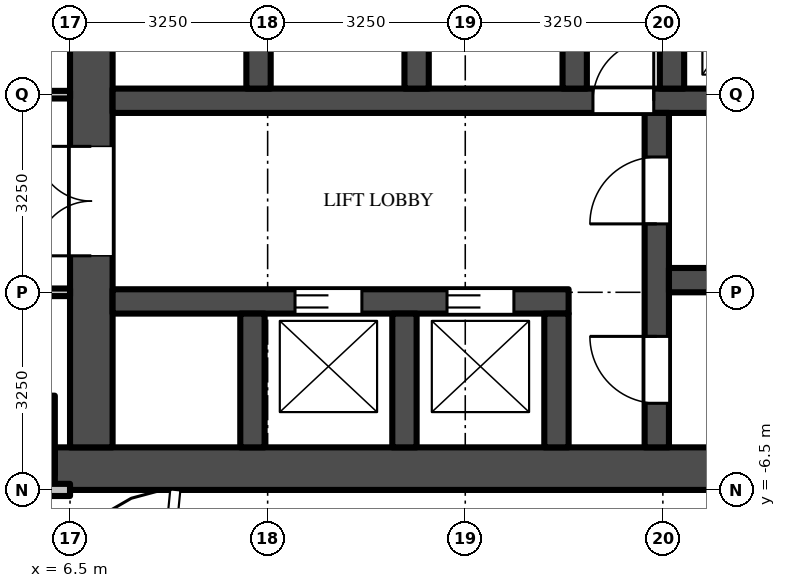
"""IFC4 building model, lengths in metres.
Left out: names, types, materials, properties, quantities, classifications, styles, units other than length and angle.
Written with IfcOpenShell. Run it as: python <this file> out.ifc"""

import sys

from ifc_helpers import new_model, si_unit, direction, frame, frame_2d, origin, origin_2d, place, context, subcontext, project, spatial, rectangle, extrude, source, transform, mapped, element, fill, save


model = new_model("IFC4")
c1 = context("Model", 3, precision=1e-05, world=origin(), true_north=direction((0.0, 1.0)))
c2 = subcontext(c1, "Body", "Model", "MODEL_VIEW")
j1 = project(units=[si_unit("LENGTHUNIT", "METRE"), si_unit("PLANEANGLEUNIT", "RADIAN")], contexts=[c1])
p1 = place(None, origin())
s1 = spatial("IfcSite", under=j1, at=p1, CompositionType="ELEMENT")
p2 = place(p1, origin())
s2 = spatial("IfcBuilding", under=s1, at=p2, CompositionType="ELEMENT")
p3 = place(p2, frame((0.0, 0.0, 129.0)))
s3 = spatial("IfcBuildingStorey", under=s2, at=p3, CompositionType="ELEMENT", Elevation=129.0)
m1 = source(origin(), c2, "Body", "SweptSolid", [
    extrude(rectangle(XDim=1.3, YDim=1.3, at=origin_2d()), origin(), (0.0, 0.0, 1.0), 4.5),
])
p4 = place(p3, frame((5.6, -5.6, 0.0), z_axis=(0.0, 0.0, 1.0), x_axis=(1.0, 0.0, 0.0)))
e1 = element("IfcColumn", 1, at=p4, inside=s3, PredefinedType="COLUMN", context=c2, shape_type="MappedRepresentation", body=[
    mapped(m1, transform((0.0, 0.0, 0.0))),
])
m2 = source(origin(), c2, "Body", "SweptSolid", [
    extrude(rectangle(XDim=16.5, YDim=0.7, at=frame_2d((8.25, 0.0))), origin(), (0.0, 0.0, 1.0), 4.25),
])
p5 = place(p3, frame((6.25, -6.15, 0.0), z_axis=(0.0, 0.0, 1.0), x_axis=(1.0, 0.0, 0.0)))
e2 = element("IfcWall", 2, at=p5, inside=s3, PredefinedType="SHEAR", context=c2, shape_type="MappedRepresentation", body=[
    mapped(m2, transform((0.0, 0.0, 0.0))),
])
m3 = source(origin(), c2, "Body", "SweptSolid", [
    extrude(rectangle(XDim=9.05, YDim=0.7, at=frame_2d((4.525, 0.0))), origin(), (0.0, 0.0, 1.0), 4.25),
])
p6 = place(p3, frame((6.85, -5.8, 0.0), z_axis=(0.0, 0.0, 1.0), x_axis=(0.0, 1.0, 0.0)))
e3 = element("IfcWall", 3, at=p6, inside=s3, PredefinedType="SHEAR", context=c2, shape_type="MappedRepresentation", body=[
    mapped(m3, transform((0.0, 0.0, 0.0))),
])
m4 = source(origin(), c2, "Body", "SweptSolid", [
    extrude(rectangle(XDim=1.8, YDim=2.1, at=frame_2d((0.9, 1.05))), frame((0.0, 0.36, 0.0), z_axis=(0.0, -1.0, 0.0), x_axis=(1.0, 0.0, 0.0)), (0.0, 0.0, 1.0), 0.72),
])
p7 = place(p6, frame((3.15, 0.0, 0.0)))
e4 = element("IfcOpeningElement", 4, at=p7, cuts=e3, PredefinedType="OPENING", context=c2, shape_type="MappedRepresentation", body=[
    mapped(m4, transform((0.0, 0.0, 0.0))),
])
m5 = source(origin(), c2, "Body", "SweptSolid", [
    extrude(rectangle(XDim=7.5, YDim=0.4, at=frame_2d((3.75, 0.0))), origin(), (0.0, 0.0, 1.0), 4.25),
])
p8 = place(p3, frame((7.2, -3.4, 0.0), z_axis=(0.0, 0.0, 1.0), x_axis=(1.0, 0.0, 0.0)))
e5 = element("IfcWall", 5, at=p8, inside=s3, PredefinedType="SHEAR", context=c2, shape_type="MappedRepresentation", body=[
    mapped(m5, transform((0.0, 0.0, 0.0))),
])
m6 = source(origin(), c2, "Body", "SweptSolid", [
    extrude(rectangle(XDim=1.1, YDim=2.1, at=frame_2d((0.55, 1.05))), frame((0.0, 0.21, 0.0), z_axis=(0.0, -1.0, 0.0), x_axis=(1.0, 0.0, 0.0)), (0.0, 0.0, 1.0), 0.42),
])
p9 = place(p8, frame((3.0, 0.0, 0.0)))
e6 = element("IfcOpeningElement", 6, at=p9, cuts=e5, PredefinedType="OPENING", context=c2, shape_type="MappedRepresentation", body=[
    mapped(m6, transform((0.0, 0.0, 0.0))),
])
p10 = place(p8, frame((5.5, 0.0, 0.0)))
e7 = element("IfcOpeningElement", 7, at=p10, cuts=e5, PredefinedType="OPENING", context=c2, shape_type="MappedRepresentation", body=[
    mapped(m6, transform((0.0, 0.0, 0.0))),
])
m7 = source(origin(), c2, "Body", "SweptSolid", [
    extrude(rectangle(XDim=14.85, YDim=0.4, at=frame_2d((7.425, 0.0))), origin(), (0.0, 0.0, 1.0), 4.25),
])
p11 = place(p3, frame((7.2, -0.1, 0.0), z_axis=(0.0, 0.0, 1.0), x_axis=(1.0, 0.0, 0.0)))
e8 = element("IfcWall", 8, at=p11, inside=s3, PredefinedType="SHEAR", context=c2, shape_type="MappedRepresentation", body=[
    mapped(m7, transform((0.0, 0.0, 0.0))),
])
m8 = source(origin(), c2, "Body", "SweptSolid", [
    extrude(rectangle(XDim=1.0, YDim=2.1, at=frame_2d((0.5, 1.05))), frame((0.0, 0.21, 0.0), z_axis=(0.0, -1.0, 0.0), x_axis=(1.0, 0.0, 0.0)), (0.0, 0.0, 1.0), 0.42),
])
p12 = place(p11, frame((7.9, 0.0, 0.0)))
e9 = element("IfcOpeningElement", 9, at=p12, cuts=e8, PredefinedType="OPENING", context=c2, shape_type="MappedRepresentation", body=[
    mapped(m8, transform((0.0, 0.0, 0.0))),
])
m9 = source(origin(), c2, "Body", "SweptSolid", [
    extrude(rectangle(XDim=5.5, YDim=0.4, at=frame_2d((2.75, 0.0))), origin(), (0.0, 0.0, 1.0), 4.25),
])
p13 = place(p3, frame((16.15, -5.8, 0.0), z_axis=(0.0, 0.0, 1.0), x_axis=(0.0, 1.0, 0.0)))
e10 = element("IfcWall", 10, at=p13, inside=s3, PredefinedType="SHEAR", context=c2, shape_type="MappedRepresentation", body=[
    mapped(m9, transform((0.0, 0.0, 0.0))),
])
p14 = place(p13, frame((0.725, 0.0, 0.0)))
e11 = element("IfcOpeningElement", 11, at=p14, cuts=e10, PredefinedType="OPENING", context=c2, shape_type="MappedRepresentation", body=[
    mapped(m6, transform((0.0, 0.0, 0.0))),
])
p15 = place(p13, frame((3.675, 0.0, 0.0)))
e12 = element("IfcOpeningElement", 12, at=p15, cuts=e10, PredefinedType="OPENING", context=c2, shape_type="MappedRepresentation", body=[
    mapped(m6, transform((0.0, 0.0, 0.0))),
])
m10 = source(origin(), c2, "Body", "SweptSolid", [
    extrude(rectangle(XDim=5.7, YDim=0.4, at=frame_2d((2.85, 0.0))), origin(), (0.0, 0.0, 1.0), 4.25),
])
p16 = place(p3, frame((16.35, -3.05, 0.0), z_axis=(0.0, 0.0, 1.0), x_axis=(1.0, 0.0, 0.0)))
e13 = element("IfcWall", 13, at=p16, inside=s3, PredefinedType="SHEAR", context=c2, shape_type="MappedRepresentation", body=[
    mapped(m10, transform((0.0, 0.0, 0.0))),
])
m11 = source(origin(), c2, "Body", "SweptSolid", [
    extrude(rectangle(XDim=2.2, YDim=0.4, at=frame_2d((1.1, 0.0))), origin(), (0.0, 0.0, 1.0), 4.25),
])
for number, where, z_axis, x_axis in (
    (14, (9.5, -5.8, 0.0), (0.0, 0.0, 1.0), (0.0, 1.0, 0.0)),
    (15, (12.0, -5.8, 0.0), (0.0, 0.0, 1.0), (0.0, 1.0, 0.0)),
    (16, (14.5, -5.8, 0.0), (0.0, 0.0, 1.0), (0.0, 1.0, 0.0)),
):
    element("IfcWall", number, at=place(p3, frame(where, z_axis=z_axis, x_axis=x_axis)), inside=s3, PredefinedType="SHEAR", context=c2, shape_type="MappedRepresentation", body=[
        mapped(m11, transform((0.0, 0.0, 0.0))),
    ])
m12 = source(origin(), c2, "Body", "SweptSolid", [
    extrude(rectangle(XDim=2.45, YDim=0.4, at=frame_2d((1.225, 0.0))), origin(), (0.0, 0.0, 1.0), 4.25),
])
for number, where, z_axis, x_axis in (
    (17, (9.6, 0.1, 0.0), (0.0, 0.0, 1.0), (0.0, 1.0, 0.0)),
    (18, (12.2, 0.1, 0.0), (0.0, 0.0, 1.0), (0.0, 1.0, 0.0)),
    (19, (14.8, 0.1, 0.0), (0.0, 0.0, 1.0), (0.0, 1.0, 0.0)),
    (20, (16.4, 0.1, 0.0), (0.0, 0.0, 1.0), (0.0, 1.0, 0.0)),
):
    element("IfcWall", number, at=place(p3, frame(where, z_axis=z_axis, x_axis=x_axis)), inside=s3, PredefinedType="SHEAR", context=c2, shape_type="MappedRepresentation", body=[
        mapped(m12, transform((0.0, 0.0, 0.0))),
    ])
m13 = source(origin(), c2, "Body", "SweptSolid", [
    extrude(rectangle(XDim=2.75, YDim=0.2, at=frame_2d((1.375, 0.0))), origin(), (0.0, 0.0, 1.0), 3.33),
])
p17 = place(p3, frame((3.75, -6.5, 0.0), z_axis=(0.0, 0.0, 1.0), x_axis=(1.0, 0.0, 0.0)))
e21 = element("IfcWall", 21, at=p17, inside=s3, PredefinedType="PARTITIONING", context=c2, shape_type="MappedRepresentation", body=[
    mapped(m13, transform((0.0, 0.0, 0.0))),
])
m14 = source(origin(), c2, "Body", "SweptSolid", [
    extrude(rectangle(XDim=5.363, YDim=0.125, at=frame_2d((2.681, 0.0))), origin(), (0.0, 0.0, 1.0), 3.468),
])
p18 = place(p3, frame((6.5, -3.25, 0.0), z_axis=(0.0, 0.0, 1.0), x_axis=(-1.0, 0.0, 0.0)))
e22 = element("IfcWall", 22, at=p18, inside=s3, PredefinedType="PARTITIONING", context=c2, shape_type="MappedRepresentation", body=[
    mapped(m14, transform((0.0, 0.0, 0.0))),
])
m15 = source(origin(), c2, "Body", "SweptSolid", [
    extrude(rectangle(XDim=1.0, YDim=2.1, at=frame_2d((0.5, 1.05))), frame((0.0, 0.073, 0.0), z_axis=(0.0, -1.0, 0.0), x_axis=(1.0, 0.0, 0.0)), (0.0, 0.0, 1.0), 0.145),
])
p19 = place(p18, frame((0.35, 0.0, 0.0)))
e23 = element("IfcOpeningElement", 23, at=p19, cuts=e22, PredefinedType="OPENING", context=c2, shape_type="MappedRepresentation", body=[
    mapped(m15, transform((0.0, 0.0, 0.0))),
])
p20 = place(p3, frame((6.5, 0.0, 0.0), z_axis=(0.0, 0.0, 1.0), x_axis=(-1.0, 0.0, 0.0)))
e24 = element("IfcWall", 24, at=p20, inside=s3, PredefinedType="PARTITIONING", context=c2, shape_type="MappedRepresentation", body=[
    mapped(m14, transform((0.0, 0.0, 0.0))),
])
p21 = place(p20, frame((3.95, 0.0, 0.0)))
e25 = element("IfcOpeningElement", 25, at=p21, cuts=e24, PredefinedType="OPENING", context=c2, shape_type="MappedRepresentation", body=[
    mapped(m15, transform((0.0, 0.0, 0.0))),
])
m16 = source(origin(), c2, "Body", "SweptSolid", [
    extrude(rectangle(XDim=1.1, YDim=2.1, at=frame_2d((0.55, 1.05))), frame((0.0, 0.025, 0.0), z_axis=(0.0, -1.0, 0.0), x_axis=(1.0, 0.0, 0.0)), (0.0, 0.0, 1.0), 0.05),
])
p22 = place(p9, origin())
e26 = element("IfcDoor", 26, at=p22, inside=s3, OperationType="DOUBLE_DOOR_SLIDING", PredefinedType="DOOR", context=c2, shape_type="MappedRepresentation", body=[
    mapped(m16, transform((0.0, 0.0, 0.0))),
])
fill(e6, e26)
p23 = place(p10, origin())
e27 = element("IfcDoor", 27, at=p23, inside=s3, OperationType="DOUBLE_DOOR_SLIDING", PredefinedType="DOOR", context=c2, shape_type="MappedRepresentation", body=[
    mapped(m16, transform((0.0, 0.0, 0.0))),
])
fill(e7, e27)
m17 = source(origin(), c2, "Body", "SweptSolid", [
    extrude(rectangle(XDim=1.8, YDim=2.1, at=frame_2d((0.9, 1.05))), frame((0.0, -0.275, 0.0), z_axis=(0.0, -1.0, 0.0), x_axis=(1.0, 0.0, 0.0)), (0.0, 0.0, 1.0), 0.05),
])
p24 = place(p7, origin())
e28 = element("IfcDoor", 28, at=p24, inside=s3, OperationType="DOUBLE_DOOR_SINGLE_SWING", PredefinedType="DOOR", context=c2, shape_type="MappedRepresentation", body=[
    mapped(m17, transform((0.0, 0.0, 0.0))),
])
fill(e4, e28)
p25 = place(p14, origin())
e29 = element("IfcDoor", 29, at=p25, inside=s3, OperationType="SINGLE_SWING_RIGHT", PredefinedType="DOOR", context=c2, shape_type="MappedRepresentation", body=[
    mapped(m16, transform((0.0, 0.0, 0.0))),
])
fill(e11, e29)
p26 = place(p15, origin())
e30 = element("IfcDoor", 30, at=p26, inside=s3, OperationType="SINGLE_SWING_LEFT", PredefinedType="DOOR", context=c2, shape_type="MappedRepresentation", body=[
    mapped(m16, transform((0.0, 0.0, 0.0))),
])
fill(e12, e30)
m18 = source(origin(), c2, "Body", "SweptSolid", [
    extrude(rectangle(XDim=1.0, YDim=2.1, at=frame_2d((0.5, 1.05))), frame((0.0, 0.025, 0.0), z_axis=(0.0, -1.0, 0.0), x_axis=(1.0, 0.0, 0.0)), (0.0, 0.0, 1.0), 0.05),
])
p27 = place(p12, origin())
e31 = element("IfcDoor", 31, at=p27, inside=s3, OperationType="SINGLE_SWING_RIGHT", PredefinedType="DOOR", context=c2, shape_type="MappedRepresentation", body=[
    mapped(m18, transform((0.0, 0.0, 0.0))),
])
fill(e9, e31)
save(model, sys.argv[1])
